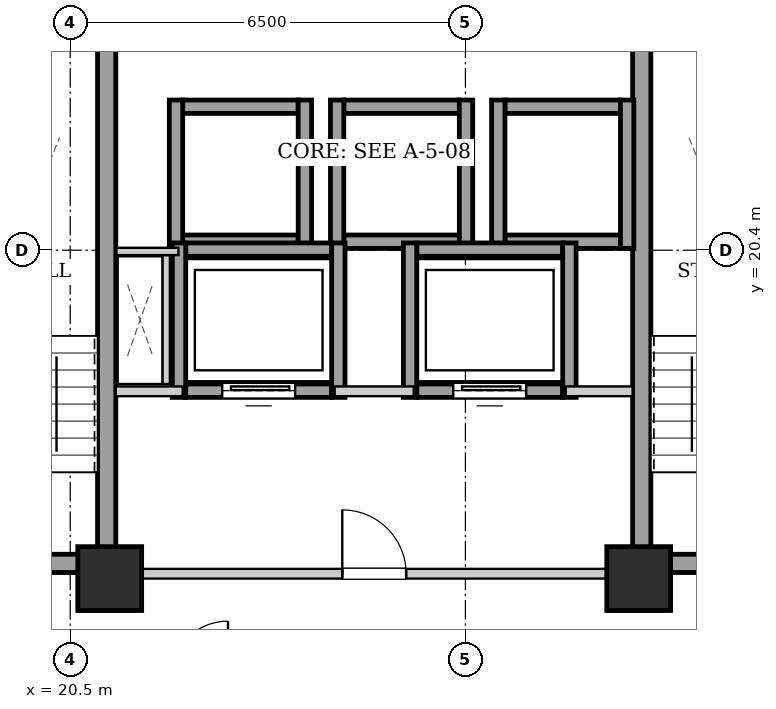
"""IFC4 building model, lengths in metres.
Left out: names, types, materials, properties, quantities, classifications, styles, units other than length and angle.
Written with IfcOpenShell. Run it as: python <this file> out.ifc"""

import sys

from ifc_helpers import new_model, si_unit, direction, frame, frame_2d, origin, origin_2d, place, context, subcontext, project, spatial, rectangle, extrude, element, fill, save


model = new_model("IFC4")
c1 = context("Model", 3, precision=1e-05, world=origin(), true_north=direction((0.0, 1.0)))
c2 = subcontext(c1, "Body", "Model", "MODEL_VIEW")
j1 = project(units=[si_unit("LENGTHUNIT", "METRE"), si_unit("PLANEANGLEUNIT", "RADIAN")], contexts=[c1])
p1 = place(None, origin())
s1 = spatial("IfcSite", under=j1, at=p1, CompositionType="ELEMENT")
p2 = place(p1, origin())
s2 = spatial("IfcBuilding", under=s1, at=p2, CompositionType="ELEMENT")
p3 = place(p2, frame((0.0, 0.0, 116.7)))
s3 = spatial("IfcBuildingStorey", under=s2, at=p3, CompositionType="ELEMENT", Elevation=116.7)
for number, where, z_axis, x_axis in (
    (1, (21.15, 15.0, 0.0), (0.0, 0.0, 1.0), (1.0, 0.0, 0.0)),
    (2, (29.85, 15.0, 0.0), (0.0, 0.0, 1.0), (1.0, 0.0, 0.0)),
):
    element("IfcColumn", number, at=place(p3, frame(where, z_axis=z_axis, x_axis=x_axis)), inside=s3, PredefinedType="COLUMN", context=c2, shape_type="SweptSolid", body=[
        extrude(rectangle(XDim=1.05, YDim=1.05, at=origin_2d()), origin(), (0.0, 0.0, 1.0), 3.2),
    ])
p4 = place(p3, frame((21.1, 15.1, 0.0), z_axis=(0.0, 0.0, 1.0), x_axis=(0.0, 1.0, 0.0)))
e3 = element("IfcWall", 3, at=p4, inside=s3, PredefinedType="SHEAR", context=c2, shape_type="SweptSolid", body=[
    extrude(rectangle(XDim=9.0, YDim=0.3, at=frame_2d((4.5, 0.0))), origin(), (0.0, 0.0, 1.0), 2.88),
])
p5 = place(p3, frame((18.1, 15.25, 0.0), z_axis=(0.0, 0.0, 1.0), x_axis=(1.0, 0.0, 0.0)))
e4 = element("IfcWall", 4, at=p5, inside=s3, PredefinedType="SHEAR", context=c2, shape_type="SweptSolid", body=[
    extrude(rectangle(XDim=2.85, YDim=0.3, at=frame_2d((1.425, 0.0))), origin(), (0.0, 0.0, 1.0), 2.88),
])
p6 = place(p5, frame((0.86, 0.0, 0.0)))
e5 = element("IfcOpeningElement", 5, at=p6, cuts=e4, PredefinedType="OPENING", context=c2, shape_type="SweptSolid", body=[
    extrude(rectangle(XDim=1.1, YDim=2.05, at=frame_2d((0.55, 1.025))), frame((0.0, 0.16, 0.0), z_axis=(0.0, -1.0, 0.0), x_axis=(1.0, 0.0, 0.0)), (0.0, 0.0, 1.0), 0.32),
])
p7 = place(p3, frame((29.9, 15.1, 0.0), z_axis=(0.0, 0.0, 1.0), x_axis=(0.0, 1.0, 0.0)))
e6 = element("IfcWall", 6, at=p7, inside=s3, PredefinedType="SHEAR", context=c2, shape_type="SweptSolid", body=[
    extrude(rectangle(XDim=9.0, YDim=0.3, at=frame_2d((4.5, 0.0))), origin(), (0.0, 0.0, 1.0), 2.88),
])
p8 = place(p3, frame((30.05, 15.25, 0.0), z_axis=(0.0, 0.0, 1.0), x_axis=(1.0, 0.0, 0.0)))
e7 = element("IfcWall", 7, at=p8, inside=s3, PredefinedType="SHEAR", context=c2, shape_type="SweptSolid", body=[
    extrude(rectangle(XDim=2.85, YDim=0.3, at=frame_2d((1.425, 0.0))), origin(), (0.0, 0.0, 1.0), 2.88),
])
p9 = place(p8, frame((0.86, 0.0, 0.0)))
e8 = element("IfcOpeningElement", 8, at=p9, cuts=e7, PredefinedType="OPENING", context=c2, shape_type="SweptSolid", body=[
    extrude(rectangle(XDim=1.1, YDim=2.05, at=frame_2d((0.55, 1.025))), frame((0.0, 0.16, 0.0), z_axis=(0.0, -1.0, 0.0), x_axis=(1.0, 0.0, 0.0)), (0.0, 0.0, 1.0), 0.32),
])
for number, where, z_axis, x_axis in (
    (9, (22.35, 20.54, 0.0), (0.0, 0.0, 1.0), (1.0, 0.0, 0.0)),
    (10, (22.35, 22.76, 0.0), (0.0, 0.0, 1.0), (1.0, 0.0, 0.0)),
):
    element("IfcWall", number, at=place(p3, frame(where, z_axis=z_axis, x_axis=x_axis)), inside=s3, PredefinedType="SHEAR", context=c2, shape_type="SweptSolid", body=[
        extrude(rectangle(XDim=1.9, YDim=0.22, at=frame_2d((0.95, 0.0))), origin(), (0.0, 0.0, 1.0), 2.88),
    ])
for number, where, z_axis, x_axis in (
    (11, (22.24, 20.43, 0.0), (0.0, 0.0, 1.0), (0.0, 1.0, 0.0)),
    (12, (24.36, 20.43, 0.0), (0.0, 0.0, 1.0), (0.0, 1.0, 0.0)),
):
    element("IfcWall", number, at=place(p3, frame(where, z_axis=z_axis, x_axis=x_axis)), inside=s3, PredefinedType="SHEAR", context=c2, shape_type="SweptSolid", body=[
        extrude(rectangle(XDim=2.44, YDim=0.22, at=frame_2d((1.22, 0.0))), origin(), (0.0, 0.0, 1.0), 2.88),
    ])
for number, where, z_axis, x_axis in (
    (13, (25.0, 20.54, 0.0), (0.0, 0.0, 1.0), (1.0, 0.0, 0.0)),
    (14, (25.0, 22.76, 0.0), (0.0, 0.0, 1.0), (1.0, 0.0, 0.0)),
):
    element("IfcWall", number, at=place(p3, frame(where, z_axis=z_axis, x_axis=x_axis)), inside=s3, PredefinedType="SHEAR", context=c2, shape_type="SweptSolid", body=[
        extrude(rectangle(XDim=1.9, YDim=0.22, at=frame_2d((0.95, 0.0))), origin(), (0.0, 0.0, 1.0), 2.88),
    ])
for number, where, z_axis, x_axis in (
    (15, (24.89, 20.43, 0.0), (0.0, 0.0, 1.0), (0.0, 1.0, 0.0)),
    (16, (27.01, 20.43, 0.0), (0.0, 0.0, 1.0), (0.0, 1.0, 0.0)),
):
    element("IfcWall", number, at=place(p3, frame(where, z_axis=z_axis, x_axis=x_axis)), inside=s3, PredefinedType="SHEAR", context=c2, shape_type="SweptSolid", body=[
        extrude(rectangle(XDim=2.44, YDim=0.22, at=frame_2d((1.22, 0.0))), origin(), (0.0, 0.0, 1.0), 2.88),
    ])
for number, where, z_axis, x_axis in (
    (17, (27.65, 20.54, 0.0), (0.0, 0.0, 1.0), (1.0, 0.0, 0.0)),
    (18, (27.65, 22.76, 0.0), (0.0, 0.0, 1.0), (1.0, 0.0, 0.0)),
):
    element("IfcWall", number, at=place(p3, frame(where, z_axis=z_axis, x_axis=x_axis)), inside=s3, PredefinedType="SHEAR", context=c2, shape_type="SweptSolid", body=[
        extrude(rectangle(XDim=1.9, YDim=0.22, at=frame_2d((0.95, 0.0))), origin(), (0.0, 0.0, 1.0), 2.88),
    ])
for number, where, z_axis, x_axis in (
    (19, (27.54, 20.43, 0.0), (0.0, 0.0, 1.0), (0.0, 1.0, 0.0)),
    (20, (29.66, 20.43, 0.0), (0.0, 0.0, 1.0), (0.0, 1.0, 0.0)),
):
    element("IfcWall", number, at=place(p3, frame(where, z_axis=z_axis, x_axis=x_axis)), inside=s3, PredefinedType="SHEAR", context=c2, shape_type="SweptSolid", body=[
        extrude(rectangle(XDim=2.44, YDim=0.22, at=frame_2d((1.22, 0.0))), origin(), (0.0, 0.0, 1.0), 2.88),
    ])
p10 = place(p3, frame((22.4, 18.09, 0.0), z_axis=(0.0, 0.0, 1.0), x_axis=(1.0, 0.0, 0.0)))
e21 = element("IfcWall", 21, at=p10, inside=s3, PredefinedType="SHEAR", context=c2, shape_type="SweptSolid", body=[
    extrude(rectangle(XDim=2.4, YDim=0.22, at=frame_2d((1.2, 0.0))), origin(), (0.0, 0.0, 1.0), 2.88),
])
p11 = place(p10, frame((0.6, 0.0, 0.0)))
e22 = element("IfcOpeningElement", 22, at=p11, cuts=e21, PredefinedType="OPENING", context=c2, shape_type="SweptSolid", body=[
    extrude(rectangle(XDim=1.2, YDim=2.15, at=frame_2d((0.6, 1.075))), frame((0.0, 0.12, 0.0), z_axis=(0.0, -1.0, 0.0), x_axis=(1.0, 0.0, 0.0)), (0.0, 0.0, 1.0), 0.24),
])
p12 = place(p3, frame((22.4, 20.41, 0.0), z_axis=(0.0, 0.0, 1.0), x_axis=(1.0, 0.0, 0.0)))
e23 = element("IfcWall", 23, at=p12, inside=s3, PredefinedType="SHEAR", context=c2, shape_type="SweptSolid", body=[
    extrude(rectangle(XDim=2.4, YDim=0.22, at=frame_2d((1.2, 0.0))), origin(), (0.0, 0.0, 1.0), 2.88),
])
for number, where, z_axis, x_axis in (
    (24, (22.29, 17.98, 0.0), (0.0, 0.0, 1.0), (0.0, 1.0, 0.0)),
    (25, (24.91, 17.98, 0.0), (0.0, 0.0, 1.0), (0.0, 1.0, 0.0)),
):
    element("IfcWall", number, at=place(p3, frame(where, z_axis=z_axis, x_axis=x_axis)), inside=s3, PredefinedType="SHEAR", context=c2, shape_type="SweptSolid", body=[
        extrude(rectangle(XDim=2.54, YDim=0.22, at=frame_2d((1.27, 0.0))), origin(), (0.0, 0.0, 1.0), 2.88),
    ])
p13 = place(p3, frame((26.2, 18.09, 0.0), z_axis=(0.0, 0.0, 1.0), x_axis=(1.0, 0.0, 0.0)))
e26 = element("IfcWall", 26, at=p13, inside=s3, PredefinedType="SHEAR", context=c2, shape_type="SweptSolid", body=[
    extrude(rectangle(XDim=2.4, YDim=0.22, at=frame_2d((1.2, 0.0))), origin(), (0.0, 0.0, 1.0), 2.88),
])
p14 = place(p13, frame((0.6, 0.0, 0.0)))
e27 = element("IfcOpeningElement", 27, at=p14, cuts=e26, PredefinedType="OPENING", context=c2, shape_type="SweptSolid", body=[
    extrude(rectangle(XDim=1.2, YDim=2.15, at=frame_2d((0.6, 1.075))), frame((0.0, 0.12, 0.0), z_axis=(0.0, -1.0, 0.0), x_axis=(1.0, 0.0, 0.0)), (0.0, 0.0, 1.0), 0.24),
])
p15 = place(p3, frame((26.2, 20.41, 0.0), z_axis=(0.0, 0.0, 1.0), x_axis=(1.0, 0.0, 0.0)))
e28 = element("IfcWall", 28, at=p15, inside=s3, PredefinedType="SHEAR", context=c2, shape_type="SweptSolid", body=[
    extrude(rectangle(XDim=2.4, YDim=0.22, at=frame_2d((1.2, 0.0))), origin(), (0.0, 0.0, 1.0), 2.88),
])
for number, where, z_axis, x_axis in (
    (29, (26.09, 17.98, 0.0), (0.0, 0.0, 1.0), (0.0, 1.0, 0.0)),
    (30, (28.71, 17.98, 0.0), (0.0, 0.0, 1.0), (0.0, 1.0, 0.0)),
):
    element("IfcWall", number, at=place(p3, frame(where, z_axis=z_axis, x_axis=x_axis)), inside=s3, PredefinedType="SHEAR", context=c2, shape_type="SweptSolid", body=[
        extrude(rectangle(XDim=2.54, YDim=0.22, at=frame_2d((1.27, 0.0))), origin(), (0.0, 0.0, 1.0), 2.88),
    ])
p16 = place(p3, frame((21.25, 15.08, 0.0), z_axis=(0.0, 0.0, 1.0), x_axis=(1.0, 0.0, 0.0)))
e31 = element("IfcWall", 31, at=p16, inside=s3, PredefinedType="PARTITIONING", context=c2, shape_type="SweptSolid", body=[
    extrude(rectangle(XDim=8.5, YDim=0.16, at=frame_2d((4.25, 0.0))), origin(), (0.0, 0.0, 1.0), 2.253),
])
p17 = place(p16, frame((3.725, 0.0, 0.0)))
e32 = element("IfcOpeningElement", 32, at=p17, cuts=e31, PredefinedType="OPENING", context=c2, shape_type="SweptSolid", body=[
    extrude(rectangle(XDim=1.05, YDim=2.05, at=frame_2d((0.525, 1.025))), frame((0.0, 0.09, 0.0), z_axis=(0.0, -1.0, 0.0), x_axis=(1.0, 0.0, 0.0)), (0.0, 0.0, 1.0), 0.18),
])
p18 = place(p3, frame((21.25, 18.08, 0.0), z_axis=(0.0, 0.0, 1.0), x_axis=(1.0, 0.0, 0.0)))
e33 = element("IfcWall", 33, at=p18, inside=s3, PredefinedType="PARTITIONING", context=c2, shape_type="SweptSolid", body=[
    extrude(rectangle(XDim=1.1, YDim=0.16, at=frame_2d((0.55, 0.0))), origin(), (0.0, 0.0, 1.0), 2.88),
])
p19 = place(p3, frame((24.85, 18.08, 0.0), z_axis=(0.0, 0.0, 1.0), x_axis=(1.0, 0.0, 0.0)))
e34 = element("IfcWall", 34, at=p19, inside=s3, PredefinedType="PARTITIONING", context=c2, shape_type="SweptSolid", body=[
    extrude(rectangle(XDim=1.3, YDim=0.16, at=frame_2d((0.65, 0.0))), origin(), (0.0, 0.0, 1.0), 2.88),
])
p20 = place(p3, frame((28.65, 18.08, 0.0), z_axis=(0.0, 0.0, 1.0), x_axis=(1.0, 0.0, 0.0)))
e35 = element("IfcWall", 35, at=p20, inside=s3, PredefinedType="PARTITIONING", context=c2, shape_type="SweptSolid", body=[
    extrude(rectangle(XDim=1.1, YDim=0.16, at=frame_2d((0.55, 0.0))), origin(), (0.0, 0.0, 1.0), 2.88),
])
p21 = place(p3, frame((22.08, 18.2, 0.0), z_axis=(0.0, 0.0, 1.0), x_axis=(0.0, 1.0, 0.0)))
e36 = element("IfcWall", 36, at=p21, inside=s3, PredefinedType="PARTITIONING", context=c2, shape_type="SweptSolid", body=[
    extrude(rectangle(XDim=2.12, YDim=0.12, at=frame_2d((1.06, 0.0))), origin(), (0.0, 0.0, 1.0), 2.88),
])
p22 = place(p3, frame((22.28, 20.38, 0.0), z_axis=(0.0, 0.0, 1.0), x_axis=(-1.0, 0.0, 0.0)))
e37 = element("IfcWall", 37, at=p22, inside=s3, PredefinedType="PARTITIONING", context=c2, shape_type="SweptSolid", body=[
    extrude(rectangle(XDim=1.02, YDim=0.12, at=frame_2d((0.51, 0.0))), origin(), (0.0, 0.0, 1.0), 2.88),
])
p23 = place(p11, origin())
e38 = element("IfcDoor", 38, at=p23, inside=s3, OperationType="SLIDING_TO_LEFT", PredefinedType="DOOR", context=c2, shape_type="SweptSolid", body=[
    extrude(rectangle(XDim=1.2, YDim=2.15, at=frame_2d((0.6, 1.075))), frame((0.0, 0.025, 0.0), z_axis=(0.0, -1.0, 0.0), x_axis=(1.0, 0.0, 0.0)), (0.0, 0.0, 1.0), 0.05),
])
fill(e22, e38)
p24 = place(p14, origin())
e39 = element("IfcDoor", 39, at=p24, inside=s3, OperationType="SLIDING_TO_LEFT", PredefinedType="DOOR", context=c2, shape_type="SweptSolid", body=[
    extrude(rectangle(XDim=1.2, YDim=2.15, at=frame_2d((0.6, 1.075))), frame((0.0, 0.025, 0.0), z_axis=(0.0, -1.0, 0.0), x_axis=(1.0, 0.0, 0.0)), (0.0, 0.0, 1.0), 0.05),
])
fill(e27, e39)
p25 = place(p17, origin())
e40 = element("IfcDoor", 40, at=p25, inside=s3, OperationType="SINGLE_SWING_LEFT", PredefinedType="DOOR", context=c2, shape_type="SweptSolid", body=[
    extrude(rectangle(XDim=1.05, YDim=2.05, at=frame_2d((0.525, 1.025))), frame((0.0, 0.025, 0.0), z_axis=(0.0, -1.0, 0.0), x_axis=(1.0, 0.0, 0.0)), (0.0, 0.0, 1.0), 0.05),
])
fill(e32, e40)
save(model, sys.argv[1])
